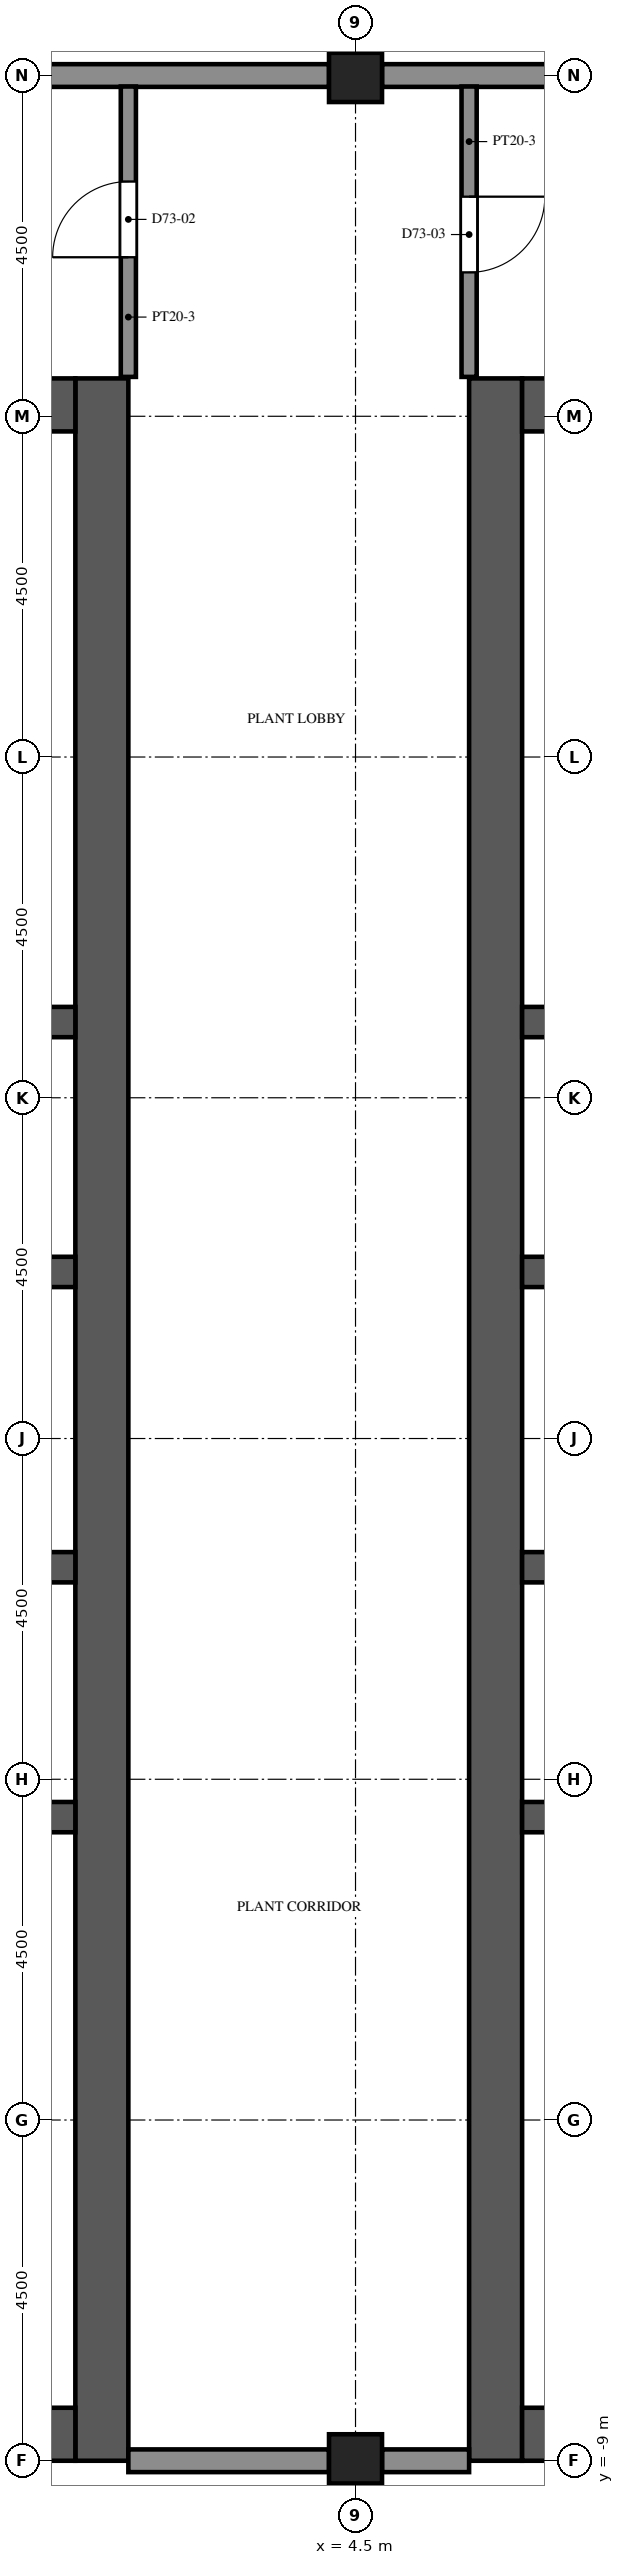
"""IFC4 building model, lengths in metres.
Left out: names, types, materials, properties, quantities, classifications, styles, units other than length and angle.
Written with IfcOpenShell. Run it as: python <this file> out.ifc"""

import sys

from ifc_helpers import new_model, si_unit, direction, frame, frame_2d, origin, origin_2d, place, context, subcontext, project, spatial, rectangle, extrude, element, fill, save


model = new_model("IFC4")
c1 = context("Model", 3, precision=1e-05, world=origin(), true_north=direction((0.0, 1.0)))
c2 = subcontext(c1, "Body", "Model", "MODEL_VIEW")
j1 = project(units=[si_unit("LENGTHUNIT", "METRE"), si_unit("PLANEANGLEUNIT", "RADIAN")], contexts=[c1])
p1 = place(None, origin())
s1 = spatial("IfcSite", under=j1, at=p1, CompositionType="ELEMENT")
p2 = place(p1, origin())
s2 = spatial("IfcBuilding", under=s1, at=p2, CompositionType="ELEMENT")
p3 = place(p2, frame((0.0, 0.0, 326.2)))
s3 = spatial("IfcBuildingStorey", under=s2, at=p3, CompositionType="ELEMENT", Elevation=326.2)
for number, where, z_axis, x_axis in (
    (1, (4.5, -9.0, 0.0), (0.0, 0.0, 1.0), (1.0, 0.0, 0.0)),
    (2, (4.5, 22.5, 0.0), (0.0, 0.0, 1.0), (1.0, 0.0, 0.0)),
):
    element("IfcColumn", number, at=place(p3, frame(where, z_axis=z_axis, x_axis=x_axis)), inside=s3, PredefinedType="COLUMN", context=c2, shape_type="SweptSolid", body=[
        extrude(rectangle(XDim=0.7, YDim=0.7, at=origin_2d()), origin(), (0.0, 0.0, 1.0), 3.6),
    ])
p4 = place(p3, frame((1.15, -9.0, 0.0), z_axis=(0.0, 0.0, 1.0), x_axis=(0.0, 1.0, 0.0)))
e3 = element("IfcWall", 3, at=p4, inside=s3, PredefinedType="SHEAR", context=c2, shape_type="SweptSolid", body=[
    extrude(rectangle(XDim=27.5, YDim=0.7, at=frame_2d((13.75, 0.0))), origin(), (0.0, 0.0, 1.0), 3.2),
])
p5 = place(p4, frame((12.55, 0.0, 0.0)))
e4 = element("IfcOpeningElement", 4, at=p5, cuts=e3, PredefinedType="OPENING", context=c2, shape_type="SweptSolid", body=[
    extrude(rectangle(XDim=2.4, YDim=2.4, at=frame_2d((1.2, 1.2))), frame((0.0, 0.36, 0.0), z_axis=(0.0, -1.0, 0.0), x_axis=(1.0, 0.0, 0.0)), (0.0, 0.0, 1.0), 0.72),
])
p6 = place(p4, frame((3.9, 0.0, 0.0)))
e5 = element("IfcOpeningElement", 5, at=p6, cuts=e3, PredefinedType="OPENING", context=c2, shape_type="SweptSolid", body=[
    extrude(rectangle(XDim=1.2, YDim=2.1, at=frame_2d((0.6, 1.05))), frame((0.0, 0.36, 0.0), z_axis=(0.0, -1.0, 0.0), x_axis=(1.0, 0.0, 0.0)), (0.0, 0.0, 1.0), 0.72),
])
p7 = place(p4, frame((22.4, 0.0, 0.0)))
e6 = element("IfcOpeningElement", 6, at=p7, cuts=e3, PredefinedType="OPENING", context=c2, shape_type="SweptSolid", body=[
    extrude(rectangle(XDim=1.2, YDim=2.1, at=frame_2d((0.6, 1.05))), frame((0.0, 0.36, 0.0), z_axis=(0.0, -1.0, 0.0), x_axis=(1.0, 0.0, 0.0)), (0.0, 0.0, 1.0), 0.72),
])
for number, where, z_axis, x_axis in (
    (7, (-9.8, -8.65, 0.0), (0.0, 0.0, 1.0), (1.0, 0.0, 0.0)),
    (8, (-9.8, 18.15, 0.0), (0.0, 0.0, 1.0), (1.0, 0.0, 0.0)),
):
    element("IfcWall", number, at=place(p3, frame(where, z_axis=z_axis, x_axis=x_axis)), inside=s3, PredefinedType="SHEAR", context=c2, shape_type="SweptSolid", body=[
        extrude(rectangle(XDim=10.6, YDim=0.7, at=frame_2d((5.3, 0.0))), origin(), (0.0, 0.0, 1.0), 3.2),
    ])
p8 = place(p3, frame((-9.8, -0.5, 0.0), z_axis=(0.0, 0.0, 1.0), x_axis=(1.0, 0.0, 0.0)))
e9 = element("IfcWall", 9, at=p8, inside=s3, PredefinedType="SHEAR", context=c2, shape_type="SweptSolid", body=[
    extrude(rectangle(XDim=10.6, YDim=0.4, at=frame_2d((5.3, 0.0))), origin(), (0.0, 0.0, 1.0), 3.2),
])
p9 = place(p3, frame((-9.8, 2.8, 0.0), z_axis=(0.0, 0.0, 1.0), x_axis=(1.0, 0.0, 0.0)))
e10 = element("IfcWall", 10, at=p9, inside=s3, PredefinedType="SHEAR", context=c2, shape_type="SweptSolid", body=[
    extrude(rectangle(XDim=10.6, YDim=0.4, at=frame_2d((5.3, 0.0))), origin(), (0.0, 0.0, 1.0), 3.2),
])
p10 = place(p9, frame((0.688, 0.0, 0.0)))
e11 = element("IfcOpeningElement", 11, at=p10, cuts=e10, PredefinedType="OPENING", context=c2, shape_type="SweptSolid", body=[
    extrude(rectangle(XDim=1.1, YDim=2.1, at=frame_2d((0.55, 1.05))), frame((0.0, 0.21, 0.0), z_axis=(0.0, -1.0, 0.0), x_axis=(1.0, 0.0, 0.0)), (0.0, 0.0, 1.0), 0.42),
])
p11 = place(p9, frame((3.488, 0.0, 0.0)))
e12 = element("IfcOpeningElement", 12, at=p11, cuts=e10, PredefinedType="OPENING", context=c2, shape_type="SweptSolid", body=[
    extrude(rectangle(XDim=1.0, YDim=2.1, at=frame_2d((0.5, 1.05))), frame((0.0, 0.21, 0.0), z_axis=(0.0, -1.0, 0.0), x_axis=(1.0, 0.0, 0.0)), (0.0, 0.0, 1.0), 0.42),
])
p12 = place(p9, frame((6.113, 0.0, 0.0)))
e13 = element("IfcOpeningElement", 13, at=p12, cuts=e10, PredefinedType="OPENING", context=c2, shape_type="SweptSolid", body=[
    extrude(rectangle(XDim=1.0, YDim=2.1, at=frame_2d((0.5, 1.05))), frame((0.0, 0.21, 0.0), z_axis=(0.0, -1.0, 0.0), x_axis=(1.0, 0.0, 0.0)), (0.0, 0.0, 1.0), 0.42),
])
p13 = place(p9, frame((8.863, 0.0, 0.0)))
e14 = element("IfcOpeningElement", 14, at=p13, cuts=e10, PredefinedType="OPENING", context=c2, shape_type="SweptSolid", body=[
    extrude(rectangle(XDim=1.0, YDim=2.1, at=frame_2d((0.5, 1.05))), frame((0.0, 0.21, 0.0), z_axis=(0.0, -1.0, 0.0), x_axis=(1.0, 0.0, 0.0)), (0.0, 0.0, 1.0), 0.42),
])
p14 = place(p3, frame((-9.8, 6.7, 0.0), z_axis=(0.0, 0.0, 1.0), x_axis=(1.0, 0.0, 0.0)))
e15 = element("IfcWall", 15, at=p14, inside=s3, PredefinedType="SHEAR", context=c2, shape_type="SweptSolid", body=[
    extrude(rectangle(XDim=10.6, YDim=0.4, at=frame_2d((5.3, 0.0))), origin(), (0.0, 0.0, 1.0), 3.2),
])
p15 = place(p14, frame((0.738, 0.0, 0.0)))
e16 = element("IfcOpeningElement", 16, at=p15, cuts=e15, PredefinedType="OPENING", context=c2, shape_type="SweptSolid", body=[
    extrude(rectangle(XDim=1.0, YDim=2.1, at=frame_2d((0.5, 1.05))), frame((0.0, 0.21, 0.0), z_axis=(0.0, -1.0, 0.0), x_axis=(1.0, 0.0, 0.0)), (0.0, 0.0, 1.0), 0.42),
])
p16 = place(p14, frame((3.488, 0.0, 0.0)))
e17 = element("IfcOpeningElement", 17, at=p16, cuts=e15, PredefinedType="OPENING", context=c2, shape_type="SweptSolid", body=[
    extrude(rectangle(XDim=1.0, YDim=2.1, at=frame_2d((0.5, 1.05))), frame((0.0, 0.21, 0.0), z_axis=(0.0, -1.0, 0.0), x_axis=(1.0, 0.0, 0.0)), (0.0, 0.0, 1.0), 0.42),
])
p17 = place(p14, frame((6.113, 0.0, 0.0)))
e18 = element("IfcOpeningElement", 18, at=p17, cuts=e15, PredefinedType="OPENING", context=c2, shape_type="SweptSolid", body=[
    extrude(rectangle(XDim=1.0, YDim=2.1, at=frame_2d((0.5, 1.05))), frame((0.0, 0.21, 0.0), z_axis=(0.0, -1.0, 0.0), x_axis=(1.0, 0.0, 0.0)), (0.0, 0.0, 1.0), 0.42),
])
p18 = place(p14, frame((8.863, 0.0, 0.0)))
e19 = element("IfcOpeningElement", 19, at=p18, cuts=e15, PredefinedType="OPENING", context=c2, shape_type="SweptSolid", body=[
    extrude(rectangle(XDim=1.0, YDim=2.1, at=frame_2d((0.5, 1.05))), frame((0.0, 0.21, 0.0), z_axis=(0.0, -1.0, 0.0), x_axis=(1.0, 0.0, 0.0)), (0.0, 0.0, 1.0), 0.42),
])
p19 = place(p3, frame((-9.8, 10.0, 0.0), z_axis=(0.0, 0.0, 1.0), x_axis=(1.0, 0.0, 0.0)))
e20 = element("IfcWall", 20, at=p19, inside=s3, PredefinedType="SHEAR", context=c2, shape_type="SweptSolid", body=[
    extrude(rectangle(XDim=10.6, YDim=0.4, at=frame_2d((5.3, 0.0))), origin(), (0.0, 0.0, 1.0), 3.2),
])
p20 = place(p3, frame((6.35, -9.0, 0.0), z_axis=(0.0, 0.0, 1.0), x_axis=(0.0, 1.0, 0.0)))
e21 = element("IfcWall", 21, at=p20, inside=s3, PredefinedType="SHEAR", context=c2, shape_type="SweptSolid", body=[
    extrude(rectangle(XDim=27.5, YDim=0.7, at=frame_2d((13.75, 0.0))), origin(), (0.0, 0.0, 1.0), 3.2),
])
p21 = place(p20, frame((12.55, 0.0, 0.0)))
e22 = element("IfcOpeningElement", 22, at=p21, cuts=e21, PredefinedType="OPENING", context=c2, shape_type="SweptSolid", body=[
    extrude(rectangle(XDim=2.4, YDim=2.4, at=frame_2d((1.2, 1.2))), frame((0.0, 0.36, 0.0), z_axis=(0.0, -1.0, 0.0), x_axis=(1.0, 0.0, 0.0)), (0.0, 0.0, 1.0), 0.72),
])
p22 = place(p20, frame((3.9, 0.0, 0.0)))
e23 = element("IfcOpeningElement", 23, at=p22, cuts=e21, PredefinedType="OPENING", context=c2, shape_type="SweptSolid", body=[
    extrude(rectangle(XDim=1.2, YDim=2.1, at=frame_2d((0.6, 1.05))), frame((0.0, 0.36, 0.0), z_axis=(0.0, -1.0, 0.0), x_axis=(1.0, 0.0, 0.0)), (0.0, 0.0, 1.0), 0.72),
])
p23 = place(p20, frame((22.4, 0.0, 0.0)))
e24 = element("IfcOpeningElement", 24, at=p23, cuts=e21, PredefinedType="OPENING", context=c2, shape_type="SweptSolid", body=[
    extrude(rectangle(XDim=1.2, YDim=2.1, at=frame_2d((0.6, 1.05))), frame((0.0, 0.36, 0.0), z_axis=(0.0, -1.0, 0.0), x_axis=(1.0, 0.0, 0.0)), (0.0, 0.0, 1.0), 0.72),
])
for number, where, z_axis, x_axis in (
    (25, (6.7, -8.65, 0.0), (0.0, 0.0, 1.0), (1.0, 0.0, 0.0)),
    (26, (6.7, 18.15, 0.0), (0.0, 0.0, 1.0), (1.0, 0.0, 0.0)),
):
    element("IfcWall", number, at=place(p3, frame(where, z_axis=z_axis, x_axis=x_axis)), inside=s3, PredefinedType="SHEAR", context=c2, shape_type="SweptSolid", body=[
        extrude(rectangle(XDim=10.6, YDim=0.7, at=frame_2d((5.3, 0.0))), origin(), (0.0, 0.0, 1.0), 3.2),
    ])
p24 = place(p3, frame((6.7, -0.5, 0.0), z_axis=(0.0, 0.0, 1.0), x_axis=(1.0, 0.0, 0.0)))
e27 = element("IfcWall", 27, at=p24, inside=s3, PredefinedType="SHEAR", context=c2, shape_type="SweptSolid", body=[
    extrude(rectangle(XDim=10.6, YDim=0.4, at=frame_2d((5.3, 0.0))), origin(), (0.0, 0.0, 1.0), 3.2),
])
p25 = place(p3, frame((6.7, 2.8, 0.0), z_axis=(0.0, 0.0, 1.0), x_axis=(1.0, 0.0, 0.0)))
e28 = element("IfcWall", 28, at=p25, inside=s3, PredefinedType="SHEAR", context=c2, shape_type="SweptSolid", body=[
    extrude(rectangle(XDim=10.6, YDim=0.4, at=frame_2d((5.3, 0.0))), origin(), (0.0, 0.0, 1.0), 3.2),
])
p26 = place(p25, frame((0.688, 0.0, 0.0)))
e29 = element("IfcOpeningElement", 29, at=p26, cuts=e28, PredefinedType="OPENING", context=c2, shape_type="SweptSolid", body=[
    extrude(rectangle(XDim=1.1, YDim=2.1, at=frame_2d((0.55, 1.05))), frame((0.0, 0.21, 0.0), z_axis=(0.0, -1.0, 0.0), x_axis=(1.0, 0.0, 0.0)), (0.0, 0.0, 1.0), 0.42),
])
p27 = place(p25, frame((3.488, 0.0, 0.0)))
e30 = element("IfcOpeningElement", 30, at=p27, cuts=e28, PredefinedType="OPENING", context=c2, shape_type="SweptSolid", body=[
    extrude(rectangle(XDim=1.0, YDim=2.1, at=frame_2d((0.5, 1.05))), frame((0.0, 0.21, 0.0), z_axis=(0.0, -1.0, 0.0), x_axis=(1.0, 0.0, 0.0)), (0.0, 0.0, 1.0), 0.42),
])
p28 = place(p25, frame((6.113, 0.0, 0.0)))
e31 = element("IfcOpeningElement", 31, at=p28, cuts=e28, PredefinedType="OPENING", context=c2, shape_type="SweptSolid", body=[
    extrude(rectangle(XDim=1.0, YDim=2.1, at=frame_2d((0.5, 1.05))), frame((0.0, 0.21, 0.0), z_axis=(0.0, -1.0, 0.0), x_axis=(1.0, 0.0, 0.0)), (0.0, 0.0, 1.0), 0.42),
])
p29 = place(p25, frame((8.863, 0.0, 0.0)))
e32 = element("IfcOpeningElement", 32, at=p29, cuts=e28, PredefinedType="OPENING", context=c2, shape_type="SweptSolid", body=[
    extrude(rectangle(XDim=1.0, YDim=2.1, at=frame_2d((0.5, 1.05))), frame((0.0, 0.21, 0.0), z_axis=(0.0, -1.0, 0.0), x_axis=(1.0, 0.0, 0.0)), (0.0, 0.0, 1.0), 0.42),
])
p30 = place(p3, frame((6.7, 6.7, 0.0), z_axis=(0.0, 0.0, 1.0), x_axis=(1.0, 0.0, 0.0)))
e33 = element("IfcWall", 33, at=p30, inside=s3, PredefinedType="SHEAR", context=c2, shape_type="SweptSolid", body=[
    extrude(rectangle(XDim=10.6, YDim=0.4, at=frame_2d((5.3, 0.0))), origin(), (0.0, 0.0, 1.0), 3.2),
])
p31 = place(p30, frame((0.738, 0.0, 0.0)))
e34 = element("IfcOpeningElement", 34, at=p31, cuts=e33, PredefinedType="OPENING", context=c2, shape_type="SweptSolid", body=[
    extrude(rectangle(XDim=1.0, YDim=2.1, at=frame_2d((0.5, 1.05))), frame((0.0, 0.21, 0.0), z_axis=(0.0, -1.0, 0.0), x_axis=(1.0, 0.0, 0.0)), (0.0, 0.0, 1.0), 0.42),
])
p32 = place(p30, frame((3.488, 0.0, 0.0)))
e35 = element("IfcOpeningElement", 35, at=p32, cuts=e33, PredefinedType="OPENING", context=c2, shape_type="SweptSolid", body=[
    extrude(rectangle(XDim=1.0, YDim=2.1, at=frame_2d((0.5, 1.05))), frame((0.0, 0.21, 0.0), z_axis=(0.0, -1.0, 0.0), x_axis=(1.0, 0.0, 0.0)), (0.0, 0.0, 1.0), 0.42),
])
p33 = place(p30, frame((6.113, 0.0, 0.0)))
e36 = element("IfcOpeningElement", 36, at=p33, cuts=e33, PredefinedType="OPENING", context=c2, shape_type="SweptSolid", body=[
    extrude(rectangle(XDim=1.0, YDim=2.1, at=frame_2d((0.5, 1.05))), frame((0.0, 0.21, 0.0), z_axis=(0.0, -1.0, 0.0), x_axis=(1.0, 0.0, 0.0)), (0.0, 0.0, 1.0), 0.42),
])
p34 = place(p30, frame((8.863, 0.0, 0.0)))
e37 = element("IfcOpeningElement", 37, at=p34, cuts=e33, PredefinedType="OPENING", context=c2, shape_type="SweptSolid", body=[
    extrude(rectangle(XDim=1.0, YDim=2.1, at=frame_2d((0.5, 1.05))), frame((0.0, 0.21, 0.0), z_axis=(0.0, -1.0, 0.0), x_axis=(1.0, 0.0, 0.0)), (0.0, 0.0, 1.0), 0.42),
])
p35 = place(p3, frame((6.7, 10.0, 0.0), z_axis=(0.0, 0.0, 1.0), x_axis=(1.0, 0.0, 0.0)))
e38 = element("IfcWall", 38, at=p35, inside=s3, PredefinedType="SHEAR", context=c2, shape_type="SweptSolid", body=[
    extrude(rectangle(XDim=10.6, YDim=0.4, at=frame_2d((5.3, 0.0))), origin(), (0.0, 0.0, 1.0), 3.2),
])
p36 = place(p3, frame((1.5, -9.0, 0.0), z_axis=(0.0, 0.0, 1.0), x_axis=(1.0, 0.0, 0.0)))
e39 = element("IfcWall", 39, at=p36, inside=s3, PredefinedType="SOLIDWALL", context=c2, shape_type="SweptSolid", body=[
    extrude(rectangle(XDim=2.65, YDim=0.3, at=frame_2d((1.325, 0.0))), origin(), (0.0, 0.0, 1.0), 0.85),
])
p37 = place(p3, frame((4.85, -9.0, 0.0), z_axis=(0.0, 0.0, 1.0), x_axis=(1.0, 0.0, 0.0)))
e40 = element("IfcWall", 40, at=p37, inside=s3, PredefinedType="SOLIDWALL", context=c2, shape_type="SweptSolid", body=[
    extrude(rectangle(XDim=1.15, YDim=0.3, at=frame_2d((0.575, 0.0))), origin(), (0.0, 0.0, 1.0), 0.85),
])
for number, where, z_axis, x_axis in (
    (41, (8.65, 22.5, 0.0), (0.0, 0.0, 1.0), (-1.0, 0.0, 0.0)),
    (42, (4.15, 22.5, 0.0), (0.0, 0.0, 1.0), (-1.0, 0.0, 0.0)),
):
    element("IfcWall", number, at=place(p3, frame(where, z_axis=z_axis, x_axis=x_axis)), inside=s3, PredefinedType="SOLIDWALL", context=c2, shape_type="SweptSolid", body=[
        extrude(rectangle(XDim=3.8, YDim=0.3, at=frame_2d((1.9, 0.0))), origin(), (0.0, 0.0, 1.0), 0.85),
    ])
p38 = place(p3, frame((1.5, 18.52, 0.0), z_axis=(0.0, 0.0, 1.0), x_axis=(0.0, 1.0, 0.0)))
e43 = element("IfcWall", 43, at=p38, inside=s3, PredefinedType="PARTITIONING", context=c2, shape_type="SweptSolid", body=[
    extrude(rectangle(XDim=3.835, YDim=0.2, at=frame_2d((1.917, 0.0))), origin(), (0.0, 0.0, 1.0), 3.2),
])
p39 = place(p38, frame((1.58, 0.0, 0.0)))
e44 = element("IfcOpeningElement", 44, at=p39, cuts=e43, PredefinedType="OPENING", context=c2, shape_type="SweptSolid", body=[
    extrude(rectangle(XDim=1.0, YDim=2.1, at=frame_2d((0.5, 1.05))), frame((0.0, 0.11, 0.0), z_axis=(0.0, -1.0, 0.0), x_axis=(1.0, 0.0, 0.0)), (0.0, 0.0, 1.0), 0.22),
])
p40 = place(p3, frame((6.0, 22.355, 0.0), z_axis=(0.0, 0.0, 1.0), x_axis=(0.0, -1.0, 0.0)))
e45 = element("IfcWall", 45, at=p40, inside=s3, PredefinedType="PARTITIONING", context=c2, shape_type="SweptSolid", body=[
    extrude(rectangle(XDim=3.835, YDim=0.2, at=frame_2d((1.917, 0.0))), origin(), (0.0, 0.0, 1.0), 3.2),
])
p41 = place(p40, frame((1.455, 0.0, 0.0)))
e46 = element("IfcOpeningElement", 46, at=p41, cuts=e45, PredefinedType="OPENING", context=c2, shape_type="SweptSolid", body=[
    extrude(rectangle(XDim=1.0, YDim=2.1, at=frame_2d((0.5, 1.05))), frame((0.0, 0.11, 0.0), z_axis=(0.0, -1.0, 0.0), x_axis=(1.0, 0.0, 0.0)), (0.0, 0.0, 1.0), 0.22),
])
p42 = place(p39, origin())
e47 = element("IfcDoor", 47, at=p42, inside=s3, OperationType="SINGLE_SWING_LEFT", PredefinedType="DOOR", context=c2, shape_type="SweptSolid", body=[
    extrude(rectangle(XDim=1.0, YDim=2.1, at=frame_2d((0.5, 1.05))), frame((0.0, 0.025, 0.0), z_axis=(0.0, -1.0, 0.0), x_axis=(1.0, 0.0, 0.0)), (0.0, 0.0, 1.0), 0.05),
])
fill(e44, e47)
p43 = place(p41, origin())
e48 = element("IfcDoor", 48, at=p43, inside=s3, OperationType="SINGLE_SWING_LEFT", PredefinedType="DOOR", context=c2, shape_type="SweptSolid", body=[
    extrude(rectangle(XDim=1.0, YDim=2.1, at=frame_2d((0.5, 1.05))), frame((0.0, 0.025, 0.0), z_axis=(0.0, -1.0, 0.0), x_axis=(1.0, 0.0, 0.0)), (0.0, 0.0, 1.0), 0.05),
])
fill(e46, e48)
p44 = place(p5, origin())
e49 = element("IfcDoor", 49, at=p44, inside=s3, OperationType="DOUBLE_DOOR_DOUBLE_SWING", PredefinedType="DOOR", context=c2, shape_type="SweptSolid", body=[
    extrude(rectangle(XDim=2.4, YDim=2.4, at=frame_2d((1.2, 1.2))), frame((0.0, 0.025, 0.0), z_axis=(0.0, -1.0, 0.0), x_axis=(1.0, 0.0, 0.0)), (0.0, 0.0, 1.0), 0.05),
])
fill(e4, e49)
p45 = place(p21, origin())
e50 = element("IfcDoor", 50, at=p45, inside=s3, OperationType="DOUBLE_DOOR_DOUBLE_SWING", PredefinedType="DOOR", context=c2, shape_type="SweptSolid", body=[
    extrude(rectangle(XDim=2.4, YDim=2.4, at=frame_2d((1.2, 1.2))), frame((0.0, 0.025, 0.0), z_axis=(0.0, -1.0, 0.0), x_axis=(1.0, 0.0, 0.0)), (0.0, 0.0, 1.0), 0.05),
])
fill(e22, e50)
p46 = place(p6, origin())
e51 = element("IfcDoor", 51, at=p46, inside=s3, OperationType="SINGLE_SWING_LEFT", PredefinedType="DOOR", context=c2, shape_type="SweptSolid", body=[
    extrude(rectangle(XDim=1.2, YDim=2.1, at=frame_2d((0.6, 1.05))), frame((0.0, 0.325, 0.0), z_axis=(0.0, -1.0, 0.0), x_axis=(1.0, 0.0, 0.0)), (0.0, 0.0, 1.0), 0.05),
])
fill(e5, e51)
p47 = place(p7, origin())
e52 = element("IfcDoor", 52, at=p47, inside=s3, OperationType="SINGLE_SWING_LEFT", PredefinedType="DOOR", context=c2, shape_type="SweptSolid", body=[
    extrude(rectangle(XDim=1.2, YDim=2.1, at=frame_2d((0.6, 1.05))), frame((0.0, 0.325, 0.0), z_axis=(0.0, -1.0, 0.0), x_axis=(1.0, 0.0, 0.0)), (0.0, 0.0, 1.0), 0.05),
])
fill(e6, e52)
p48 = place(p22, origin())
e53 = element("IfcDoor", 53, at=p48, inside=s3, OperationType="SINGLE_SWING_RIGHT", PredefinedType="DOOR", context=c2, shape_type="SweptSolid", body=[
    extrude(rectangle(XDim=1.2, YDim=2.1, at=frame_2d((0.6, 1.05))), frame((0.0, -0.275, 0.0), z_axis=(0.0, -1.0, 0.0), x_axis=(1.0, 0.0, 0.0)), (0.0, 0.0, 1.0), 0.05),
])
fill(e23, e53)
p49 = place(p23, origin())
e54 = element("IfcDoor", 54, at=p49, inside=s3, OperationType="SINGLE_SWING_RIGHT", PredefinedType="DOOR", context=c2, shape_type="SweptSolid", body=[
    extrude(rectangle(XDim=1.2, YDim=2.1, at=frame_2d((0.6, 1.05))), frame((0.0, -0.275, 0.0), z_axis=(0.0, -1.0, 0.0), x_axis=(1.0, 0.0, 0.0)), (0.0, 0.0, 1.0), 0.05),
])
fill(e24, e54)
save(model, sys.argv[1])
